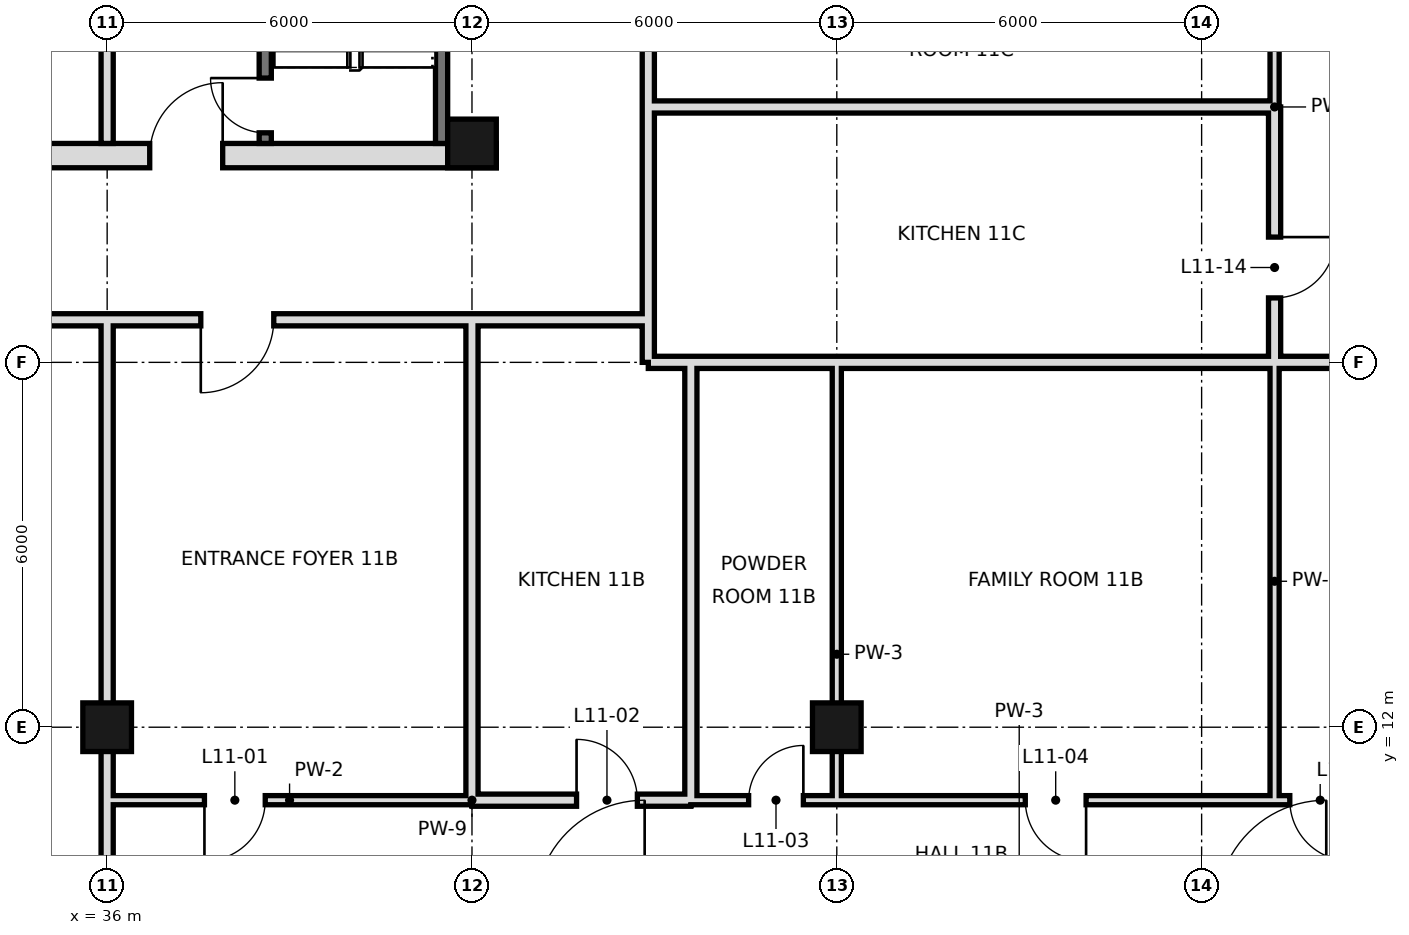
"""IFC4 building model, lengths in metres.
Left out: names, types, materials, properties, quantities, classifications, styles, units other than length and angle.
Written with IfcOpenShell. Run it as: python <this file> out.ifc"""

import sys

from ifc_helpers import new_model, si_unit, direction, frame, frame_2d, origin, origin_2d, place, context, subcontext, project, spatial, rectangle, hollow_rectangle, extrude, element, fill, save


model = new_model("IFC4")
c1 = context("Model", 3, precision=1e-05, world=origin(), true_north=direction((0.0, 1.0)))
c2 = subcontext(c1, "Body", "Model", "MODEL_VIEW")
j1 = project(units=[si_unit("LENGTHUNIT", "METRE"), si_unit("PLANEANGLEUNIT", "RADIAN")], contexts=[c1])
p1 = place(None, origin())
s1 = spatial("IfcSite", under=j1, at=p1, CompositionType="ELEMENT")
p2 = place(p1, origin())
s2 = spatial("IfcBuilding", under=s1, at=p2, CompositionType="ELEMENT")
p3 = place(p2, frame((0.0, 0.0, 60.6)))
s3 = spatial("IfcBuildingStorey", under=s2, at=p3, CompositionType="ELEMENT", Elevation=60.6)
p4 = place(p3, frame((36.0, 12.0, 0.0), z_axis=(0.0, 0.0, 1.0), x_axis=(1.0, 0.0, 0.0)))
e1 = element("IfcColumn", 1, at=p4, inside=s3, PredefinedType="COLUMN", context=c2, shape_type="SweptSolid", body=[
    extrude(hollow_rectangle(XDim=0.8, YDim=0.8, WallThickness=0.04, at=origin_2d()), origin(), (0.0, 0.0, 1.0), 3.6),
])
p5 = place(p3, frame((42.0, 21.6, 0.0), z_axis=(0.0, 0.0, 1.0), x_axis=(1.0, 0.0, 0.0)))
e2 = element("IfcColumn", 2, at=p5, inside=s3, PredefinedType="COLUMN", context=c2, shape_type="SweptSolid", body=[
    extrude(hollow_rectangle(XDim=0.8, YDim=0.8, WallThickness=0.06, at=origin_2d()), origin(), (0.0, 0.0, 1.0), 3.6),
])
p6 = place(p3, frame((48.0, 12.0, 0.0), z_axis=(0.0, 0.0, 1.0), x_axis=(1.0, 0.0, 0.0)))
e3 = element("IfcColumn", 3, at=p6, inside=s3, PredefinedType="COLUMN", context=c2, shape_type="SweptSolid", body=[
    extrude(hollow_rectangle(XDim=0.8, YDim=0.8, WallThickness=0.04, at=origin_2d()), origin(), (0.0, 0.0, 1.0), 3.6),
])
p7 = place(p3, frame((36.0, 0.0, 0.0), z_axis=(0.0, 0.0, 1.0), x_axis=(0.0, 1.0, 0.0)))
e4 = element("IfcWall", 4, at=p7, inside=s3, PredefinedType="SOLIDWALL", context=c2, shape_type="SweptSolid", body=[
    extrude(rectangle(XDim=18.7, YDim=0.2, at=frame_2d((9.35, 0.0))), origin(), (0.0, 0.0, 1.0), 2.72),
])
p8 = place(p3, frame((42.0, 10.8, 0.0), z_axis=(0.0, 0.0, 1.0), x_axis=(0.0, 1.0, 0.0)))
e5 = element("IfcWall", 5, at=p8, inside=s3, PredefinedType="SOLIDWALL", context=c2, shape_type="SweptSolid", body=[
    extrude(rectangle(XDim=7.9, YDim=0.2, at=frame_2d((3.95, 0.0))), origin(), (0.0, 0.0, 1.0), 2.72),
])
p9 = place(p3, frame((44.9, 22.2, 0.0), z_axis=(0.0, 0.0, 1.0), x_axis=(0.0, 1.0, 0.0)))
e6 = element("IfcWall", 6, at=p9, inside=s3, PredefinedType="SOLIDWALL", context=c2, shape_type="SweptSolid", body=[
    extrude(rectangle(XDim=26.4, YDim=0.2, at=frame_2d((13.2, 0.0))), origin(), (0.0, 0.0, 1.0), 2.72),
])
p10 = place(p9, frame((12.98, 0.0, 0.0)))
e7 = element("IfcOpeningElement", 7, at=p10, cuts=e6, PredefinedType="OPENING", context=c2, shape_type="SweptSolid", body=[
    extrude(rectangle(XDim=1.2, YDim=2.4, at=frame_2d((0.6, 1.2))), frame((0.0, 0.11, 0.0), z_axis=(0.0, -1.0, 0.0), x_axis=(1.0, 0.0, 0.0)), (0.0, 0.0, 1.0), 0.22),
])
p11 = place(p3, frame((44.9, 18.0, 0.0), z_axis=(0.0, 0.0, 1.0), x_axis=(0.0, 1.0, 0.0)))
e8 = element("IfcWall", 8, at=p11, inside=s3, PredefinedType="SOLIDWALL", context=c2, shape_type="SweptSolid", body=[
    extrude(rectangle(XDim=4.2, YDim=0.2, at=frame_2d((2.1, 0.0))), origin(), (0.0, 0.0, 1.0), 2.97),
])
p12 = place(p3, frame((45.6, 10.8, 0.0), z_axis=(0.0, 0.0, 1.0), x_axis=(0.0, 1.0, 0.0)))
e9 = element("IfcWall", 9, at=p12, inside=s3, PredefinedType="SOLIDWALL", context=c2, shape_type="SweptSolid", body=[
    extrude(rectangle(XDim=7.2, YDim=0.2, at=frame_2d((3.6, 0.0))), origin(), (0.0, 0.0, 1.0), 2.72),
])
p13 = place(p3, frame((48.0, 10.8, 0.0), z_axis=(0.0, 0.0, 1.0), x_axis=(0.0, 1.0, 0.0)))
e10 = element("IfcWall", 10, at=p13, inside=s3, PredefinedType="PARTITIONING", context=c2, shape_type="SweptSolid", body=[
    extrude(rectangle(XDim=7.2, YDim=0.15, at=frame_2d((3.6, 0.0))), origin(), (0.0, 0.0, 1.0), 2.72),
])
p14 = place(p3, frame((55.2, 18.0, 0.0), z_axis=(0.0, 0.0, 1.0), x_axis=(0.0, 1.0, 0.0)))
e11 = element("IfcWall", 11, at=p14, inside=s3, PredefinedType="SOLIDWALL", context=c2, shape_type="SweptSolid", body=[
    extrude(rectangle(XDim=4.2, YDim=0.2, at=frame_2d((2.1, 0.0))), origin(), (0.0, 0.0, 1.0), 2.52),
])
p15 = place(p14, frame((1.06, 0.0, 0.0)))
e12 = element("IfcOpeningElement", 12, at=p15, cuts=e11, PredefinedType="OPENING", context=c2, shape_type="SweptSolid", body=[
    extrude(rectangle(XDim=1.0, YDim=2.4, at=frame_2d((0.5, 1.2))), frame((0.0, 0.11, 0.0), z_axis=(0.0, -1.0, 0.0), x_axis=(1.0, 0.0, 0.0)), (0.0, 0.0, 1.0), 0.22),
])
p16 = place(p3, frame((55.2, 10.8, 0.0), z_axis=(0.0, 0.0, 1.0), x_axis=(0.0, 1.0, 0.0)))
e13 = element("IfcWall", 13, at=p16, inside=s3, PredefinedType="PARTITIONING", context=c2, shape_type="SweptSolid", body=[
    extrude(rectangle(XDim=7.2, YDim=0.15, at=frame_2d((3.6, 0.0))), origin(), (0.0, 0.0, 1.0), 3.42),
])
p17 = place(p3, frame((55.2, 22.2, 0.0), z_axis=(0.0, 0.0, 1.0), x_axis=(0.0, 1.0, 0.0)))
e14 = element("IfcWall", 14, at=p17, inside=s3, PredefinedType="PARTITIONING", context=c2, shape_type="SweptSolid", body=[
    extrude(rectangle(XDim=2.4, YDim=0.15, at=frame_2d((1.2, 0.0))), origin(), (0.0, 0.0, 1.0), 3.42),
])
p18 = place(p17, frame((0.95, 0.0, 0.0)))
e15 = element("IfcOpeningElement", 15, at=p18, cuts=e14, PredefinedType="OPENING", context=c2, shape_type="SweptSolid", body=[
    extrude(rectangle(XDim=0.9, YDim=2.4, at=frame_2d((0.45, 1.2))), frame((0.0, 0.085, 0.0), z_axis=(0.0, -1.0, 0.0), x_axis=(1.0, 0.0, 0.0)), (0.0, 0.0, 1.0), 0.17),
])
p19 = place(p3, frame((42.0, 10.8, 0.0), z_axis=(0.0, 0.0, 1.0), x_axis=(1.0, 0.0, 0.0)))
e16 = element("IfcWall", 16, at=p19, inside=s3, PredefinedType="SOLIDWALL", context=c2, shape_type="SweptSolid", body=[
    extrude(rectangle(XDim=3.6, YDim=0.2, at=frame_2d((1.8, 0.0))), origin(), (0.0, 0.0, 1.0), 2.72),
])
p20 = place(p19, frame((1.72, 0.0, 0.0)))
e17 = element("IfcOpeningElement", 17, at=p20, cuts=e16, PredefinedType="OPENING", context=c2, shape_type="SweptSolid", body=[
    extrude(rectangle(XDim=1.0, YDim=2.4, at=frame_2d((0.5, 1.2))), frame((0.0, 0.11, 0.0), z_axis=(0.0, -1.0, 0.0), x_axis=(1.0, 0.0, 0.0)), (0.0, 0.0, 1.0), 0.22),
])
p21 = place(p3, frame((36.0, 10.8, 0.0), z_axis=(0.0, 0.0, 1.0), x_axis=(1.0, 0.0, 0.0)))
e18 = element("IfcWall", 18, at=p21, inside=s3, PredefinedType="PARTITIONING", context=c2, shape_type="SweptSolid", body=[
    extrude(rectangle(XDim=6.0, YDim=0.15, at=frame_2d((3.0, 0.0))), origin(), (0.0, 0.0, 1.0), 3.42),
])
p22 = place(p21, frame((1.6, 0.0, 0.0)))
e19 = element("IfcOpeningElement", 19, at=p22, cuts=e18, PredefinedType="OPENING", context=c2, shape_type="SweptSolid", body=[
    extrude(rectangle(XDim=1.0, YDim=2.4, at=frame_2d((0.5, 1.2))), frame((0.0, 0.085, 0.0), z_axis=(0.0, -1.0, 0.0), x_axis=(1.0, 0.0, 0.0)), (0.0, 0.0, 1.0), 0.17),
])
p23 = place(p3, frame((48.0, 10.8, 0.0), z_axis=(0.0, 0.0, 1.0), x_axis=(1.0, 0.0, 0.0)))
e20 = element("IfcWall", 20, at=p23, inside=s3, PredefinedType="PARTITIONING", context=c2, shape_type="SweptSolid", body=[
    extrude(rectangle(XDim=18.6, YDim=0.15, at=frame_2d((9.3, 0.0))), origin(), (0.0, 0.0, 1.0), 3.42),
])
p24 = place(p23, frame((3.1, 0.0, 0.0)))
e21 = element("IfcOpeningElement", 21, at=p24, cuts=e20, PredefinedType="OPENING", context=c2, shape_type="SweptSolid", body=[
    extrude(rectangle(XDim=1.0, YDim=2.4, at=frame_2d((0.5, 1.2))), frame((0.0, 0.085, 0.0), z_axis=(0.0, -1.0, 0.0), x_axis=(1.0, 0.0, 0.0)), (0.0, 0.0, 1.0), 0.17),
])
p25 = place(p23, frame((7.45, 0.0, 0.0)))
e22 = element("IfcOpeningElement", 22, at=p25, cuts=e20, PredefinedType="OPENING", context=c2, shape_type="SweptSolid", body=[
    extrude(rectangle(XDim=1.0, YDim=2.4, at=frame_2d((0.5, 1.2))), frame((0.0, 0.085, 0.0), z_axis=(0.0, -1.0, 0.0), x_axis=(1.0, 0.0, 0.0)), (0.0, 0.0, 1.0), 0.17),
])
p26 = place(p3, frame((45.6, 10.8, 0.0), z_axis=(0.0, 0.0, 1.0), x_axis=(1.0, 0.0, 0.0)))
e23 = element("IfcWall", 23, at=p26, inside=s3, PredefinedType="PARTITIONING", context=c2, shape_type="SweptSolid", body=[
    extrude(rectangle(XDim=2.4, YDim=0.15, at=frame_2d((1.2, 0.0))), origin(), (0.0, 0.0, 1.0), 3.42),
])
p27 = place(p26, frame((0.95, 0.0, 0.0)))
e24 = element("IfcOpeningElement", 24, at=p27, cuts=e23, PredefinedType="OPENING", context=c2, shape_type="SweptSolid", body=[
    extrude(rectangle(XDim=0.9, YDim=2.4, at=frame_2d((0.45, 1.2))), frame((0.0, 0.085, 0.0), z_axis=(0.0, -1.0, 0.0), x_axis=(1.0, 0.0, 0.0)), (0.0, 0.0, 1.0), 0.17),
])
p28 = place(p3, frame((44.9, 18.0, 0.0), z_axis=(0.0, 0.0, 1.0), x_axis=(1.0, 0.0, 0.0)))
e25 = element("IfcWall", 25, at=p28, inside=s3, PredefinedType="SOLIDWALL", context=c2, shape_type="SweptSolid", body=[
    extrude(rectangle(XDim=10.3, YDim=0.2, at=frame_2d((5.15, 0.0))), origin(), (0.0, 0.0, 1.0), 2.52),
])
p29 = place(p3, frame((55.2, 18.0, 0.0), z_axis=(0.0, 0.0, 1.0), x_axis=(1.0, 0.0, 0.0)))
e26 = element("IfcWall", 26, at=p29, inside=s3, PredefinedType="SOLIDWALL", context=c2, shape_type="SweptSolid", body=[
    extrude(rectangle(XDim=11.4, YDim=0.2, at=frame_2d((5.7, 0.0))), origin(), (0.0, 0.0, 1.0), 2.52),
])
p30 = place(p3, frame((3.1, 18.7, 0.0), z_axis=(0.0, 0.0, 1.0), x_axis=(1.0, 0.0, 0.0)))
e27 = element("IfcWall", 27, at=p30, inside=s3, PredefinedType="SOLIDWALL", context=c2, shape_type="SweptSolid", body=[
    extrude(rectangle(XDim=38.9, YDim=0.2, at=frame_2d((19.45, 0.0))), origin(), (0.0, 0.0, 1.0), 2.72),
])
p31 = place(p30, frame((34.44, 0.0, 0.0)))
e28 = element("IfcOpeningElement", 28, at=p31, cuts=e27, PredefinedType="OPENING", context=c2, shape_type="SweptSolid", body=[
    extrude(rectangle(XDim=1.2, YDim=2.4, at=frame_2d((0.6, 1.2))), frame((0.0, 0.11, 0.0), z_axis=(0.0, -1.0, 0.0), x_axis=(1.0, 0.0, 0.0)), (0.0, 0.0, 1.0), 0.22),
])
p32 = place(p30, frame((9.43, 0.0, 0.0)))
e29 = element("IfcOpeningElement", 29, at=p32, cuts=e27, PredefinedType="OPENING", context=c2, shape_type="SweptSolid", body=[
    extrude(rectangle(XDim=1.8, YDim=2.4, at=frame_2d((0.9, 1.2))), frame((0.0, 0.11, 0.0), z_axis=(0.0, -1.0, 0.0), x_axis=(1.0, 0.0, 0.0)), (0.0, 0.0, 1.0), 0.22),
])
p33 = place(p3, frame((42.0, 18.7, 0.0), z_axis=(0.0, 0.0, 1.0), x_axis=(1.0, 0.0, 0.0)))
e30 = element("IfcWall", 30, at=p33, inside=s3, PredefinedType="SOLIDWALL", context=c2, shape_type="SweptSolid", body=[
    extrude(rectangle(XDim=2.9, YDim=0.2, at=frame_2d((1.45, 0.0))), origin(), (0.0, 0.0, 1.0), 2.72),
])
p34 = place(p3, frame((44.9, 22.2, 0.0), z_axis=(0.0, 0.0, 1.0), x_axis=(1.0, 0.0, 0.0)))
e31 = element("IfcWall", 31, at=p34, inside=s3, PredefinedType="SOLIDWALL", context=c2, shape_type="SweptSolid", body=[
    extrude(rectangle(XDim=10.3, YDim=0.2, at=frame_2d((5.15, 0.0))), origin(), (0.0, 0.0, 1.0), 2.72),
])
p35 = place(p3, frame((41.5, 21.6, 0.0), z_axis=(0.0, 0.0, 1.0), x_axis=(0.0, 1.0, 0.0)))
e32 = element("IfcWall", 32, at=p35, inside=s3, PredefinedType="SOLIDWALL", context=c2, shape_type="SweptSolid", body=[
    extrude(rectangle(XDim=23.5, YDim=0.2, at=frame_2d((11.75, 0.0))), origin(), (0.0, 0.0, 1.0), 3.42),
])
p36 = place(p3, frame((5.6, 21.4, 0.0), z_axis=(0.0, 0.0, 1.0), x_axis=(1.0, 0.0, 0.0)))
e33 = element("IfcWall", 33, at=p36, inside=s3, PredefinedType="SOLIDWALL", context=c2, shape_type="SweptSolid", body=[
    extrude(rectangle(XDim=36.8, YDim=0.4, at=frame_2d((18.4, 0.0))), origin(), (0.0, 0.0, 1.0), 3.42),
])
p37 = place(p36, frame((8.5, 0.0, 0.0)))
e34 = element("IfcOpeningElement", 34, at=p37, cuts=e33, PredefinedType="OPENING", context=c2, shape_type="SweptSolid", body=[
    extrude(rectangle(XDim=1.8, YDim=2.1, at=frame_2d((0.9, 1.05))), frame((0.0, 0.21, 0.0), z_axis=(0.0, -1.0, 0.0), x_axis=(1.0, 0.0, 0.0)), (0.0, 0.0, 1.0), 0.42),
])
p38 = place(p36, frame((17.5, 0.0, 0.0)))
e35 = element("IfcOpeningElement", 35, at=p38, cuts=e33, PredefinedType="OPENING", context=c2, shape_type="SweptSolid", body=[
    extrude(rectangle(XDim=1.8, YDim=2.1, at=frame_2d((0.9, 1.05))), frame((0.0, 0.21, 0.0), z_axis=(0.0, -1.0, 0.0), x_axis=(1.0, 0.0, 0.0)), (0.0, 0.0, 1.0), 0.42),
])
p39 = place(p36, frame((26.5, 0.0, 0.0)))
e36 = element("IfcOpeningElement", 36, at=p39, cuts=e33, PredefinedType="OPENING", context=c2, shape_type="SweptSolid", body=[
    extrude(rectangle(XDim=1.8, YDim=2.1, at=frame_2d((0.9, 1.05))), frame((0.0, 0.21, 0.0), z_axis=(0.0, -1.0, 0.0), x_axis=(1.0, 0.0, 0.0)), (0.0, 0.0, 1.0), 0.42),
])
p40 = place(p36, frame((4.5, 0.0, 0.0)))
e37 = element("IfcOpeningElement", 37, at=p40, cuts=e33, PredefinedType="OPENING", context=c2, shape_type="SweptSolid", body=[
    extrude(rectangle(XDim=1.2, YDim=2.1, at=frame_2d((0.6, 1.05))), frame((0.0, 0.21, 0.0), z_axis=(0.0, -1.0, 0.0), x_axis=(1.0, 0.0, 0.0)), (0.0, 0.0, 1.0), 0.42),
])
p41 = place(p36, frame((31.1, 0.0, 0.0)))
e38 = element("IfcOpeningElement", 38, at=p41, cuts=e33, PredefinedType="OPENING", context=c2, shape_type="SweptSolid", body=[
    extrude(rectangle(XDim=1.2, YDim=2.1, at=frame_2d((0.6, 1.05))), frame((0.0, 0.21, 0.0), z_axis=(0.0, -1.0, 0.0), x_axis=(1.0, 0.0, 0.0)), (0.0, 0.0, 1.0), 0.42),
])
p42 = place(p3, frame((36.0, 21.6, 0.0), z_axis=(0.0, 0.0, 1.0), x_axis=(0.0, 1.0, 0.0)))
e39 = element("IfcWall", 39, at=p42, inside=s3, PredefinedType="PARTITIONING", context=c2, shape_type="SweptSolid", body=[
    extrude(rectangle(XDim=6.1, YDim=0.2, at=frame_2d((3.05, 0.0))), origin(), (0.0, 0.0, 1.0), 3.42),
])
p43 = place(p3, frame((38.6, 21.6, 0.0), z_axis=(0.0, 0.0, 1.0), x_axis=(0.0, 1.0, 0.0)))
e40 = element("IfcWall", 40, at=p43, inside=s3, PredefinedType="SOLIDWALL", context=c2, shape_type="SweptSolid", body=[
    extrude(rectangle(XDim=23.4, YDim=0.2, at=frame_2d((11.7, 0.0))), origin(), (0.0, 0.0, 1.0), 3.42),
])
p44 = place(p43, frame((8.6, 0.0, 0.0)))
e41 = element("IfcOpeningElement", 41, at=p44, cuts=e40, PredefinedType="OPENING", context=c2, shape_type="SweptSolid", body=[
    extrude(rectangle(XDim=1.0, YDim=2.1, at=frame_2d((0.5, 1.05))), frame((0.0, 0.11, 0.0), z_axis=(0.0, -1.0, 0.0), x_axis=(1.0, 0.0, 0.0)), (0.0, 0.0, 1.0), 0.22),
])
p45 = place(p43, frame((13.25, 0.0, 0.0)))
e42 = element("IfcOpeningElement", 42, at=p45, cuts=e40, PredefinedType="OPENING", context=c2, shape_type="SweptSolid", body=[
    extrude(rectangle(XDim=1.0, YDim=2.1, at=frame_2d((0.5, 1.05))), frame((0.0, 0.11, 0.0), z_axis=(0.0, -1.0, 0.0), x_axis=(1.0, 0.0, 0.0)), (0.0, 0.0, 1.0), 0.22),
])
p46 = place(p43, frame((15.7, 0.0, 0.0)))
e43 = element("IfcOpeningElement", 43, at=p46, cuts=e40, PredefinedType="OPENING", context=c2, shape_type="SweptSolid", body=[
    extrude(rectangle(XDim=1.0, YDim=2.1, at=frame_2d((0.5, 1.05))), frame((0.0, 0.11, 0.0), z_axis=(0.0, -1.0, 0.0), x_axis=(1.0, 0.0, 0.0)), (0.0, 0.0, 1.0), 0.22),
])
p47 = place(p43, frame((0.175, 0.0, 0.0)))
e44 = element("IfcOpeningElement", 44, at=p47, cuts=e40, PredefinedType="OPENING", context=c2, shape_type="SweptSolid", body=[
    extrude(rectangle(XDim=0.9, YDim=2.1, at=frame_2d((0.45, 1.05))), frame((0.0, 0.11, 0.0), z_axis=(0.0, -1.0, 0.0), x_axis=(1.0, 0.0, 0.0)), (0.0, 0.0, 1.0), 0.22),
])
p48 = place(p22, frame((1.0, 0.0, 0.0), z_axis=(0.0, 0.0, 1.0), x_axis=(-1.0, 0.0, 0.0)))
e45 = element("IfcDoor", 45, at=p48, inside=s3, OperationType="SINGLE_SWING_RIGHT", PredefinedType="DOOR", context=c2, shape_type="SweptSolid", body=[
    extrude(rectangle(XDim=1.0, YDim=2.4, at=frame_2d((0.5, 1.2))), frame((0.0, 0.025, 0.0), z_axis=(0.0, -1.0, 0.0), x_axis=(1.0, 0.0, 0.0)), (0.0, 0.0, 1.0), 0.05),
])
fill(e19, e45)
p49 = place(p20, origin())
e46 = element("IfcDoor", 46, at=p49, inside=s3, OperationType="SINGLE_SWING_LEFT", PredefinedType="DOOR", context=c2, shape_type="SweptSolid", body=[
    extrude(rectangle(XDim=1.0, YDim=2.4, at=frame_2d((0.5, 1.2))), frame((0.0, 0.025, 0.0), z_axis=(0.0, -1.0, 0.0), x_axis=(1.0, 0.0, 0.0)), (0.0, 0.0, 1.0), 0.05),
])
fill(e17, e46)
p50 = place(p27, frame((0.9, 0.0, 0.0), z_axis=(0.0, 0.0, 1.0), x_axis=(-1.0, 0.0, 0.0)))
e47 = element("IfcDoor", 47, at=p50, inside=s3, OperationType="SINGLE_SWING_LEFT", PredefinedType="DOOR", context=c2, shape_type="SweptSolid", body=[
    extrude(rectangle(XDim=0.9, YDim=2.4, at=frame_2d((0.45, 1.2))), frame((0.0, 0.025, 0.0), z_axis=(0.0, -1.0, 0.0), x_axis=(1.0, 0.0, 0.0)), (0.0, 0.0, 1.0), 0.05),
])
fill(e24, e47)
p51 = place(p24, origin())
e48 = element("IfcDoor", 48, at=p51, inside=s3, OperationType="SINGLE_SWING_RIGHT", PredefinedType="DOOR", context=c2, shape_type="SweptSolid", body=[
    extrude(rectangle(XDim=1.0, YDim=2.4, at=frame_2d((0.5, 1.2))), frame((0.0, 0.025, 0.0), z_axis=(0.0, -1.0, 0.0), x_axis=(1.0, 0.0, 0.0)), (0.0, 0.0, 1.0), 0.05),
])
fill(e21, e48)
p52 = place(p25, origin())
e49 = element("IfcDoor", 49, at=p52, inside=s3, OperationType="SINGLE_SWING_RIGHT", PredefinedType="DOOR", context=c2, shape_type="SweptSolid", body=[
    extrude(rectangle(XDim=1.0, YDim=2.4, at=frame_2d((0.5, 1.2))), frame((0.0, 0.025, 0.0), z_axis=(0.0, -1.0, 0.0), x_axis=(1.0, 0.0, 0.0)), (0.0, 0.0, 1.0), 0.05),
])
fill(e22, e49)
p53 = place(p15, origin())
e50 = element("IfcDoor", 50, at=p53, inside=s3, OperationType="SINGLE_SWING_RIGHT", PredefinedType="DOOR", context=c2, shape_type="SweptSolid", body=[
    extrude(rectangle(XDim=1.0, YDim=2.4, at=frame_2d((0.5, 1.2))), frame((0.0, 0.025, 0.0), z_axis=(0.0, -1.0, 0.0), x_axis=(1.0, 0.0, 0.0)), (0.0, 0.0, 1.0), 0.05),
])
fill(e12, e50)
p54 = place(p31, frame((1.2, 0.0, 0.0), z_axis=(0.0, 0.0, 1.0), x_axis=(-1.0, 0.0, 0.0)))
e51 = element("IfcDoor", 51, at=p54, inside=s3, OperationType="SINGLE_SWING_RIGHT", PredefinedType="DOOR", context=c2, shape_type="SweptSolid", body=[
    extrude(rectangle(XDim=1.2, YDim=2.4, at=frame_2d((0.6, 1.2))), frame((0.0, 0.025, 0.0), z_axis=(0.0, -1.0, 0.0), x_axis=(1.0, 0.0, 0.0)), (0.0, 0.0, 1.0), 0.05),
])
fill(e28, e51)
p55 = place(p41, frame((1.2, 0.0, 0.0), z_axis=(0.0, 0.0, 1.0), x_axis=(-1.0, 0.0, 0.0)))
e52 = element("IfcDoor", 52, at=p55, inside=s3, OperationType="SINGLE_SWING_LEFT", PredefinedType="DOOR", context=c2, shape_type="SweptSolid", body=[
    extrude(rectangle(XDim=1.2, YDim=2.1, at=frame_2d((0.6, 1.05))), frame((0.0, 0.025, 0.0), z_axis=(0.0, -1.0, 0.0), x_axis=(1.0, 0.0, 0.0)), (0.0, 0.0, 1.0), 0.05),
])
fill(e38, e52)
p56 = place(p47, frame((0.9, 0.0, 0.0), z_axis=(0.0, 0.0, 1.0), x_axis=(-1.0, 0.0, 0.0)))
e53 = element("IfcDoor", 53, at=p56, inside=s3, OperationType="SINGLE_SWING_LEFT", PredefinedType="DOOR", context=c2, shape_type="SweptSolid", body=[
    extrude(rectangle(XDim=0.9, YDim=2.1, at=frame_2d((0.45, 1.05))), frame((0.0, 0.025, 0.0), z_axis=(0.0, -1.0, 0.0), x_axis=(1.0, 0.0, 0.0)), (0.0, 0.0, 1.0), 0.05),
])
fill(e44, e53)
save(model, sys.argv[1])
